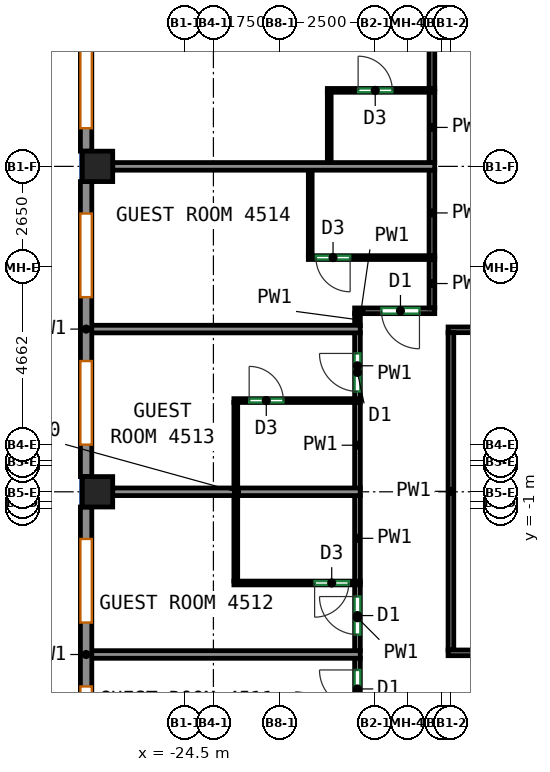
"""IFC4 building model, lengths in metres.
Left out: names, types, materials, properties, quantities, classifications, styles, units other than length and angle.
Written with IfcOpenShell. Run it as: python <this file> out.ifc"""

import sys

from ifc_helpers import new_model, si_unit, direction, frame, frame_2d, origin, origin_2d, place, context, subcontext, project, spatial, rectangle, extrude, source, transform, mapped, element, fill, save


model = new_model("IFC4")
c1 = context("Model", 3, precision=1e-05, world=origin(), true_north=direction((0.0, 1.0)))
c2 = subcontext(c1, "Body", "Model", "MODEL_VIEW")
j1 = project(units=[si_unit("LENGTHUNIT", "METRE"), si_unit("PLANEANGLEUNIT", "RADIAN")], contexts=[c1])
p1 = place(None, origin())
s1 = spatial("IfcSite", under=j1, at=p1, CompositionType="ELEMENT")
p2 = place(p1, origin())
s2 = spatial("IfcBuilding", under=s1, at=p2, CompositionType="ELEMENT")
p3 = place(p2, frame((0.0, 0.0, 188.9)))
s3 = spatial("IfcBuildingStorey", under=s2, at=p3, CompositionType="ELEMENT", Elevation=188.9)
m1 = source(origin(), c2, "Body", "SweptSolid", [
    extrude(rectangle(XDim=0.8, YDim=0.8, at=origin_2d()), origin(), (0.0, 0.0, 1.0), 3.12),
])
for number, where, z_axis, x_axis in (
    (1, (-26.8, -0.562, 0.0), (0.0, 0.0, 1.0), (1.0, 0.0, 0.0)),
    (2, (-26.8, 8.0, 0.0), (0.0, 0.0, 1.0), (1.0, 0.0, 0.0)),
):
    element("IfcColumn", number, at=place(p3, frame(where, z_axis=z_axis, x_axis=x_axis)), inside=s3, PredefinedType="COLUMN", context=c2, shape_type="MappedRepresentation", body=[
        mapped(m1, transform((0.0, 0.0, 0.0))),
    ])
m2 = source(origin(), c2, "Body", "SweptSolid", [
    extrude(rectangle(XDim=13.632, YDim=0.3, at=frame_2d((6.816, 0.0))), origin(), (0.0, 0.0, 1.0), 3.12),
])
p4 = place(p3, frame((-27.1, 22.032, 0.0), z_axis=(0.0, 0.0, 1.0), x_axis=(0.0, -1.0, 0.0)))
e3 = element("IfcWall", 3, at=p4, inside=s3, PredefinedType="SOLIDWALL", context=c2, shape_type="MappedRepresentation", body=[
    mapped(m2, transform((0.0, 0.0, 0.0))),
])
p5 = place(p4, frame((0.604, 0.0, 0.85)))
e4 = element("IfcOpeningElement", 4, at=p5, cuts=e3, PredefinedType="OPENING", context=c2, shape_type="SweptSolid", body=[
    extrude(rectangle(XDim=2.2, YDim=1.95, at=frame_2d((1.1, 0.975))), frame((0.0, 0.16, 0.0), z_axis=(0.0, -1.0, 0.0), x_axis=(1.0, 0.0, 0.0)), (0.0, 0.0, 1.0), 0.32),
])
p6 = place(p4, frame((4.012, 0.0, 0.85)))
e5 = element("IfcOpeningElement", 5, at=p6, cuts=e3, PredefinedType="OPENING", context=c2, shape_type="SweptSolid", body=[
    extrude(rectangle(XDim=2.2, YDim=1.95, at=frame_2d((1.1, 0.975))), frame((0.0, 0.16, 0.0), z_axis=(0.0, -1.0, 0.0), x_axis=(1.0, 0.0, 0.0)), (0.0, 0.0, 1.0), 0.32),
])
p7 = place(p4, frame((7.42, 0.0, 0.85)))
e6 = element("IfcOpeningElement", 6, at=p7, cuts=e3, PredefinedType="OPENING", context=c2, shape_type="SweptSolid", body=[
    extrude(rectangle(XDim=2.2, YDim=1.95, at=frame_2d((1.1, 0.975))), frame((0.0, 0.16, 0.0), z_axis=(0.0, -1.0, 0.0), x_axis=(1.0, 0.0, 0.0)), (0.0, 0.0, 1.0), 0.32),
])
p8 = place(p4, frame((10.828, 0.0, 0.85)))
e7 = element("IfcOpeningElement", 7, at=p8, cuts=e3, PredefinedType="OPENING", context=c2, shape_type="SweptSolid", body=[
    extrude(rectangle(XDim=2.2, YDim=1.95, at=frame_2d((1.1, 0.975))), frame((0.0, 0.16, 0.0), z_axis=(0.0, -1.0, 0.0), x_axis=(1.0, 0.0, 0.0)), (0.0, 0.0, 1.0), 0.32),
])
m3 = source(origin(), c2, "Body", "SweptSolid", [
    extrude(rectangle(XDim=7.763, YDim=0.3, at=frame_2d((3.881, 0.0))), origin(), (0.0, 0.0, 1.0), 3.12),
])
p9 = place(p3, frame((-27.1, 7.6, 0.0), z_axis=(0.0, 0.0, 1.0), x_axis=(0.0, -1.0, 0.0)))
e8 = element("IfcWall", 8, at=p9, inside=s3, PredefinedType="SOLIDWALL", context=c2, shape_type="MappedRepresentation", body=[
    mapped(m3, transform((0.0, 0.0, 0.0))),
])
p10 = place(p9, frame((0.841, 0.0, 0.85)))
e9 = element("IfcOpeningElement", 9, at=p10, cuts=e8, PredefinedType="OPENING", context=c2, shape_type="SweptSolid", body=[
    extrude(rectangle(XDim=2.2, YDim=1.95, at=frame_2d((1.1, 0.975))), frame((0.0, 0.16, 0.0), z_axis=(0.0, -1.0, 0.0), x_axis=(1.0, 0.0, 0.0)), (0.0, 0.0, 1.0), 0.32),
])
p11 = place(p9, frame((4.722, 0.0, 0.85)))
e10 = element("IfcOpeningElement", 10, at=p11, cuts=e8, PredefinedType="OPENING", context=c2, shape_type="SweptSolid", body=[
    extrude(rectangle(XDim=2.2, YDim=1.95, at=frame_2d((1.1, 0.975))), frame((0.0, 0.16, 0.0), z_axis=(0.0, -1.0, 0.0), x_axis=(1.0, 0.0, 0.0)), (0.0, 0.0, 1.0), 0.32),
])
p12 = place(p3, frame((-27.1, -0.962, 0.0), z_axis=(0.0, 0.0, 1.0), x_axis=(0.0, -1.0, 0.0)))
e11 = element("IfcWall", 11, at=p12, inside=s3, PredefinedType="SOLIDWALL", context=c2, shape_type="MappedRepresentation", body=[
    mapped(m3, transform((0.0, 0.0, 0.0))),
])
p13 = place(p12, frame((0.841, 0.0, 0.85)))
e12 = element("IfcOpeningElement", 12, at=p13, cuts=e11, PredefinedType="OPENING", context=c2, shape_type="SweptSolid", body=[
    extrude(rectangle(XDim=2.2, YDim=1.95, at=frame_2d((1.1, 0.975))), frame((0.0, 0.16, 0.0), z_axis=(0.0, -1.0, 0.0), x_axis=(1.0, 0.0, 0.0)), (0.0, 0.0, 1.0), 0.32),
])
p14 = place(p12, frame((4.722, 0.0, 0.85)))
e13 = element("IfcOpeningElement", 13, at=p14, cuts=e11, PredefinedType="OPENING", context=c2, shape_type="SweptSolid", body=[
    extrude(rectangle(XDim=2.2, YDim=1.95, at=frame_2d((1.1, 0.975))), frame((0.0, 0.16, 0.0), z_axis=(0.0, -1.0, 0.0), x_axis=(1.0, 0.0, 0.0)), (0.0, 0.0, 1.0), 0.32),
])
p15 = place(p3, frame((-19.959, -6.685, 0.0), z_axis=(0.0, 0.0, 1.0), x_axis=(0.0, 1.0, 0.0)))
e14 = element("IfcWall", 14, at=p15, inside=s3, PredefinedType="PARTITIONING", context=c2, shape_type="SweptSolid", body=[
    extrude(rectangle(XDim=1.752, YDim=0.15, at=frame_2d((0.876, 0.0))), origin(), (0.0, 0.0, 1.0), 3.12),
])
p16 = place(p15, frame((0.435, 0.0, 0.0)))
e15 = element("IfcOpeningElement", 15, at=p16, cuts=e14, PredefinedType="OPENING", context=c2, shape_type="SweptSolid", body=[
    extrude(rectangle(XDim=1.0, YDim=2.1, at=frame_2d((0.5, 1.05))), frame((0.0, 0.085, 0.0), z_axis=(0.0, -1.0, 0.0), x_axis=(1.0, 0.0, 0.0)), (0.0, 0.0, 1.0), 0.17),
])
p17 = place(p3, frame((-19.959, -4.753, 0.0), z_axis=(0.0, 0.0, 1.0), x_axis=(0.0, 1.0, 0.0)))
e16 = element("IfcWall", 16, at=p17, inside=s3, PredefinedType="PARTITIONING", context=c2, shape_type="SweptSolid", body=[
    extrude(rectangle(XDim=1.751, YDim=0.15, at=frame_2d((0.875, 0.0))), origin(), (0.0, 0.0, 1.0), 3.12),
])
p18 = place(p17, frame((0.434, 0.0, 0.0)))
e17 = element("IfcOpeningElement", 17, at=p18, cuts=e16, PredefinedType="OPENING", context=c2, shape_type="SweptSolid", body=[
    extrude(rectangle(XDim=1.0, YDim=2.1, at=frame_2d((0.5, 1.05))), frame((0.0, 0.085, 0.0), z_axis=(0.0, -1.0, 0.0), x_axis=(1.0, 0.0, 0.0)), (0.0, 0.0, 1.0), 0.17),
])
p19 = place(p3, frame((-19.959, -2.922, 0.0), z_axis=(0.0, 0.0, 1.0), x_axis=(0.0, 1.0, 0.0)))
e18 = element("IfcWall", 18, at=p19, inside=s3, PredefinedType="PARTITIONING", context=c2, shape_type="SweptSolid", body=[
    extrude(rectangle(XDim=2.27, YDim=0.15, at=frame_2d((1.135, 0.0))), origin(), (0.0, 0.0, 1.0), 3.12),
])
p20 = place(p3, frame((-19.959, 1.878, 0.0), z_axis=(0.0, 0.0, 1.0), x_axis=(0.0, 1.0, 0.0)))
e19 = element("IfcWall", 19, at=p20, inside=s3, PredefinedType="PARTITIONING", context=c2, shape_type="SweptSolid", body=[
    extrude(rectangle(XDim=1.751, YDim=0.15, at=frame_2d((0.875, 0.0))), origin(), (0.0, 0.0, 1.0), 3.12),
])
p21 = place(p20, frame((0.2, 0.0, 0.0)))
e20 = element("IfcOpeningElement", 20, at=p21, cuts=e19, PredefinedType="OPENING", context=c2, shape_type="SweptSolid", body=[
    extrude(rectangle(XDim=1.0, YDim=2.1, at=frame_2d((0.5, 1.05))), frame((0.0, 0.085, 0.0), z_axis=(0.0, -1.0, 0.0), x_axis=(1.0, 0.0, 0.0)), (0.0, 0.0, 1.0), 0.17),
])
p22 = place(p3, frame((-19.959, -0.472, 0.0), z_axis=(0.0, 0.0, 1.0), x_axis=(0.0, 1.0, 0.0)))
e21 = element("IfcWall", 21, at=p22, inside=s3, PredefinedType="PARTITIONING", context=c2, shape_type="SweptSolid", body=[
    extrude(rectangle(XDim=2.27, YDim=0.15, at=frame_2d((1.135, 0.0))), origin(), (0.0, 0.0, 1.0), 3.12),
])
p23 = place(p3, frame((-19.959, 3.809, 0.0), z_axis=(0.0, 0.0, 1.0), x_axis=(0.0, 1.0, 0.0)))
e22 = element("IfcWall", 22, at=p23, inside=s3, PredefinedType="PARTITIONING", context=c2, shape_type="SweptSolid", body=[
    extrude(rectangle(XDim=0.316, YDim=0.15, at=frame_2d((0.158, 0.0))), origin(), (0.0, 0.0, 1.0), 3.12),
])
p24 = place(p3, frame((-17.925, 4.2, 0.0), z_axis=(0.0, 0.0, 1.0), x_axis=(-1.0, 0.0, 0.0)))
e23 = element("IfcWall", 23, at=p24, inside=s3, PredefinedType="PARTITIONING", context=c2, shape_type="SweptSolid", body=[
    extrude(rectangle(XDim=2.109, YDim=0.15, at=frame_2d((1.054, 0.0))), origin(), (0.0, 0.0, 1.0), 3.12),
])
p25 = place(p24, frame((0.403, 0.0, 0.0)))
e24 = element("IfcOpeningElement", 24, at=p25, cuts=e23, PredefinedType="OPENING", context=c2, shape_type="SweptSolid", body=[
    extrude(rectangle(XDim=1.0, YDim=2.1, at=frame_2d((0.5, 1.05))), frame((0.0, 0.085, 0.0), z_axis=(0.0, -1.0, 0.0), x_axis=(1.0, 0.0, 0.0)), (0.0, 0.0, 1.0), 0.17),
])
p26 = place(p3, frame((-18.0, 4.275, 0.0), z_axis=(0.0, 0.0, 1.0), x_axis=(0.0, 1.0, 0.0)))
e25 = element("IfcWall", 25, at=p26, inside=s3, PredefinedType="PARTITIONING", context=c2, shape_type="SweptSolid", body=[
    extrude(rectangle(XDim=1.285, YDim=0.15, at=frame_2d((0.643, 0.0))), origin(), (0.0, 0.0, 1.0), 3.12),
])
p27 = place(p3, frame((-18.0, 5.64, 0.0), z_axis=(0.0, 0.0, 1.0), x_axis=(0.0, 1.0, 0.0)))
e26 = element("IfcWall", 26, at=p27, inside=s3, PredefinedType="PARTITIONING", context=c2, shape_type="SweptSolid", body=[
    extrude(rectangle(XDim=2.27, YDim=0.15, at=frame_2d((1.135, 0.0))), origin(), (0.0, 0.0, 1.0), 3.12),
])
p28 = place(p3, frame((-18.0, 10.04, 0.0), z_axis=(0.0, 0.0, 1.0), x_axis=(0.0, 1.0, 0.0)))
e27 = element("IfcWall", 27, at=p28, inside=s3, PredefinedType="PARTITIONING", context=c2, shape_type="SweptSolid", body=[
    extrude(rectangle(XDim=4.707, YDim=0.15, at=frame_2d((2.354, 0.0))), origin(), (0.0, 0.0, 1.0), 3.12),
])
p29 = place(p28, frame((3.206, 0.0, 0.0)))
e28 = element("IfcOpeningElement", 28, at=p29, cuts=e27, PredefinedType="OPENING", context=c2, shape_type="SweptSolid", body=[
    extrude(rectangle(XDim=1.0, YDim=2.1, at=frame_2d((0.5, 1.05))), frame((0.0, 0.085, 0.0), z_axis=(0.0, -1.0, 0.0), x_axis=(1.0, 0.0, 0.0)), (0.0, 0.0, 1.0), 0.17),
])
p30 = place(p3, frame((-18.0, 8.09, 0.0), z_axis=(0.0, 0.0, 1.0), x_axis=(0.0, 1.0, 0.0)))
e29 = element("IfcWall", 29, at=p30, inside=s3, PredefinedType="PARTITIONING", context=c2, shape_type="SweptSolid", body=[
    extrude(rectangle(XDim=1.87, YDim=0.15, at=frame_2d((0.935, 0.0))), origin(), (0.0, 0.0, 1.0), 3.12),
])
p31 = place(p3, frame((-17.575, 3.7, 0.0), z_axis=(0.0, 0.0, 1.0), x_axis=(1.0, 0.0, 0.0)))
e30 = element("IfcWall", 30, at=p31, inside=s3, PredefinedType="PARTITIONING", context=c2, shape_type="SweptSolid", body=[
    extrude(rectangle(XDim=33.85, YDim=0.15, at=frame_2d((16.925, 0.0))), origin(), (0.0, 0.0, 1.0), 3.12),
])
p32 = place(p31, frame((10.584, 0.0, 0.0)))
e31 = element("IfcOpeningElement", 31, at=p32, cuts=e30, PredefinedType="OPENING", context=c2, shape_type="SweptSolid", body=[
    extrude(rectangle(XDim=0.9, YDim=2.1, at=frame_2d((0.45, 1.05))), frame((0.0, 0.085, 0.0), z_axis=(0.0, -1.0, 0.0), x_axis=(1.0, 0.0, 0.0)), (0.0, 0.0, 1.0), 0.17),
])
p33 = place(p31, frame((16.175, 0.0, 0.0)))
e32 = element("IfcOpeningElement", 32, at=p33, cuts=e30, PredefinedType="OPENING", context=c2, shape_type="SweptSolid", body=[
    extrude(rectangle(XDim=0.9, YDim=2.1, at=frame_2d((0.45, 1.05))), frame((0.0, 0.085, 0.0), z_axis=(0.0, -1.0, 0.0), x_axis=(1.0, 0.0, 0.0)), (0.0, 0.0, 1.0), 0.17),
])
p34 = place(p31, frame((25.696, 0.0, 0.0)))
e33 = element("IfcOpeningElement", 33, at=p34, cuts=e30, PredefinedType="OPENING", context=c2, shape_type="SweptSolid", body=[
    extrude(rectangle(XDim=0.9, YDim=2.1, at=frame_2d((0.45, 1.05))), frame((0.0, 0.085, 0.0), z_axis=(0.0, -1.0, 0.0), x_axis=(1.0, 0.0, 0.0)), (0.0, 0.0, 1.0), 0.17),
])
p35 = place(p3, frame((-17.5, -4.725, 0.0), z_axis=(0.0, 0.0, 1.0), x_axis=(0.0, 1.0, 0.0)))
e34 = element("IfcWall", 34, at=p35, inside=s3, PredefinedType="PARTITIONING", context=c2, shape_type="SweptSolid", body=[
    extrude(rectangle(XDim=8.35, YDim=0.15, at=frame_2d((4.175, 0.0))), origin(), (0.0, 0.0, 1.0), 3.12),
])
p36 = place(p3, frame((-17.575, -4.8, 0.0), z_axis=(0.0, 0.0, 1.0), x_axis=(1.0, 0.0, 0.0)))
e35 = element("IfcWall", 35, at=p36, inside=s3, PredefinedType="PARTITIONING", context=c2, shape_type="SweptSolid", body=[
    extrude(rectangle(XDim=3.702, YDim=0.15, at=frame_2d((1.851, 0.0))), origin(), (0.0, 0.0, 1.0), 3.12),
])
p37 = place(p3, frame((-27.0, -4.843, 0.0), z_axis=(0.0, 0.0, 1.0), x_axis=(1.0, 0.0, 0.0)))
e36 = element("IfcWall", 36, at=p37, inside=s3, PredefinedType="PARTITIONING", context=c2, shape_type="SweptSolid", body=[
    extrude(rectangle(XDim=7.114, YDim=0.2, at=frame_2d((3.557, 0.0))), origin(), (0.0, 0.0, 1.0), 3.12),
])
p38 = place(p3, frame((-19.886, -2.962, 0.0), z_axis=(0.0, 0.0, 1.0), x_axis=(-1.0, 0.0, 0.0)))
e37 = element("IfcWall", 37, at=p38, inside=s3, PredefinedType="PARTITIONING", context=c2, shape_type="SweptSolid", body=[
    extrude(rectangle(XDim=3.325, YDim=0.1, at=frame_2d((1.663, 0.0))), origin(), (0.0, 0.0, 1.0), 3.12),
])
p39 = place(p38, frame((0.301, 0.0, 0.0)))
e38 = element("IfcOpeningElement", 38, at=p39, cuts=e37, PredefinedType="OPENING", context=c2, shape_type="SweptSolid", body=[
    extrude(rectangle(XDim=0.9, YDim=2.1, at=frame_2d((0.45, 1.05))), frame((0.0, 0.06, 0.0), z_axis=(0.0, -1.0, 0.0), x_axis=(1.0, 0.0, 0.0)), (0.0, 0.0, 1.0), 0.12),
])
p40 = place(p3, frame((-23.161, -2.912, 0.0), z_axis=(0.0, 0.0, 1.0), x_axis=(0.0, 1.0, 0.0)))
e39 = element("IfcWall", 39, at=p40, inside=s3, PredefinedType="PARTITIONING", context=c2, shape_type="SweptSolid", body=[
    extrude(rectangle(XDim=2.25, YDim=0.1, at=frame_2d((1.125, 0.0))), origin(), (0.0, 0.0, 1.0), 3.12),
])
p41 = place(p3, frame((-26.4, -0.562, 0.0), z_axis=(0.0, 0.0, 1.0), x_axis=(1.0, 0.0, 0.0)))
e40 = element("IfcWall", 40, at=p41, inside=s3, PredefinedType="PARTITIONING", context=c2, shape_type="SweptSolid", body=[
    extrude(rectangle(XDim=6.514, YDim=0.2, at=frame_2d((3.257, 0.0))), origin(), (0.0, 0.0, 1.0), 2.52),
])
p42 = place(p3, frame((-23.211, 1.838, 0.0), z_axis=(0.0, 0.0, 1.0), x_axis=(1.0, 0.0, 0.0)))
e41 = element("IfcWall", 41, at=p42, inside=s3, PredefinedType="PARTITIONING", context=c2, shape_type="SweptSolid", body=[
    extrude(rectangle(XDim=3.325, YDim=0.1, at=frame_2d((1.663, 0.0))), origin(), (0.0, 0.0, 1.0), 3.12),
])
p43 = place(p42, frame((0.402, 0.0, 0.0)))
e42 = element("IfcOpeningElement", 42, at=p43, cuts=e41, PredefinedType="OPENING", context=c2, shape_type="SweptSolid", body=[
    extrude(rectangle(XDim=0.9, YDim=2.1, at=frame_2d((0.45, 1.05))), frame((0.0, 0.06, 0.0), z_axis=(0.0, -1.0, 0.0), x_axis=(1.0, 0.0, 0.0)), (0.0, 0.0, 1.0), 0.12),
])
p44 = place(p3, frame((-23.161, -0.462, 0.0), z_axis=(0.0, 0.0, 1.0), x_axis=(0.0, 1.0, 0.0)))
e43 = element("IfcWall", 43, at=p44, inside=s3, PredefinedType="PARTITIONING", context=c2, shape_type="SweptSolid", body=[
    extrude(rectangle(XDim=2.25, YDim=0.1, at=frame_2d((1.125, 0.0))), origin(), (0.0, 0.0, 1.0), 3.12),
])
p45 = place(p3, frame((-27.0, 3.719, 0.0), z_axis=(0.0, 0.0, 1.0), x_axis=(1.0, 0.0, 0.0)))
e44 = element("IfcWall", 44, at=p45, inside=s3, PredefinedType="PARTITIONING", context=c2, shape_type="SweptSolid", body=[
    extrude(rectangle(XDim=7.114, YDim=0.2, at=frame_2d((3.557, 0.0))), origin(), (0.0, 0.0, 1.0), 3.12),
])
p46 = place(p3, frame((-17.927, 5.6, 0.0), z_axis=(0.0, 0.0, 1.0), x_axis=(-1.0, 0.0, 0.0)))
e45 = element("IfcWall", 45, at=p46, inside=s3, PredefinedType="PARTITIONING", context=c2, shape_type="SweptSolid", body=[
    extrude(rectangle(XDim=3.325, YDim=0.1, at=frame_2d((1.663, 0.0))), origin(), (0.0, 0.0, 1.0), 3.12),
])
p47 = place(p46, frame((2.225, 0.0, 0.0)))
e46 = element("IfcOpeningElement", 46, at=p47, cuts=e45, PredefinedType="OPENING", context=c2, shape_type="SweptSolid", body=[
    extrude(rectangle(XDim=0.9, YDim=2.1, at=frame_2d((0.45, 1.05))), frame((0.0, 0.06, 0.0), z_axis=(0.0, -1.0, 0.0), x_axis=(1.0, 0.0, 0.0)), (0.0, 0.0, 1.0), 0.12),
])
p48 = place(p3, frame((-21.202, 5.65, 0.0), z_axis=(0.0, 0.0, 1.0), x_axis=(0.0, 1.0, 0.0)))
e47 = element("IfcWall", 47, at=p48, inside=s3, PredefinedType="PARTITIONING", context=c2, shape_type="SweptSolid", body=[
    extrude(rectangle(XDim=2.25, YDim=0.1, at=frame_2d((1.125, 0.0))), origin(), (0.0, 0.0, 1.0), 3.12),
])
p49 = place(p3, frame((-26.4, 8.0, 0.0), z_axis=(0.0, 0.0, 1.0), x_axis=(1.0, 0.0, 0.0)))
e48 = element("IfcWall", 48, at=p49, inside=s3, PredefinedType="PARTITIONING", context=c2, shape_type="SweptSolid", body=[
    extrude(rectangle(XDim=8.473, YDim=0.2, at=frame_2d((4.236, 0.0))), origin(), (0.0, 0.0, 1.0), 3.12),
])
p50 = place(p3, frame((-20.752, 10.0, 0.0), z_axis=(0.0, 0.0, 1.0), x_axis=(1.0, 0.0, 0.0)))
e49 = element("IfcWall", 49, at=p50, inside=s3, PredefinedType="PARTITIONING", context=c2, shape_type="SweptSolid", body=[
    extrude(rectangle(XDim=2.825, YDim=0.1, at=frame_2d((1.413, 0.0))), origin(), (0.0, 0.0, 1.0), 3.12),
])
p51 = place(p50, frame((0.81, 0.0, 0.0)))
e50 = element("IfcOpeningElement", 50, at=p51, cuts=e49, PredefinedType="OPENING", context=c2, shape_type="SweptSolid", body=[
    extrude(rectangle(XDim=0.9, YDim=2.1, at=frame_2d((0.45, 1.05))), frame((0.0, 0.06, 0.0), z_axis=(0.0, -1.0, 0.0), x_axis=(1.0, 0.0, 0.0)), (0.0, 0.0, 1.0), 0.12),
])
p52 = place(p3, frame((-20.702, 8.1, 0.0), z_axis=(0.0, 0.0, 1.0), x_axis=(0.0, 1.0, 0.0)))
e51 = element("IfcWall", 51, at=p52, inside=s3, PredefinedType="PARTITIONING", context=c2, shape_type="SweptSolid", body=[
    extrude(rectangle(XDim=1.85, YDim=0.1, at=frame_2d((0.925, 0.0))), origin(), (0.0, 0.0, 1.0), 3.12),
])
p53 = place(p8, origin())
e52 = element("IfcWindow", 52, at=p53, inside=s3, PartitioningType="SINGLE_PANEL", PredefinedType="WINDOW", context=c2, shape_type="SweptSolid", body=[
    extrude(rectangle(XDim=2.2, YDim=1.95, at=frame_2d((1.1, 0.975))), frame((0.0, 0.03, 0.0), z_axis=(0.0, -1.0, 0.0), x_axis=(1.0, 0.0, 0.0)), (0.0, 0.0, 1.0), 0.06),
])
fill(e7, e52)
p54 = place(p10, origin())
e53 = element("IfcWindow", 53, at=p54, inside=s3, PartitioningType="SINGLE_PANEL", PredefinedType="WINDOW", context=c2, shape_type="SweptSolid", body=[
    extrude(rectangle(XDim=2.2, YDim=1.95, at=frame_2d((1.1, 0.975))), frame((0.0, 0.03, 0.0), z_axis=(0.0, -1.0, 0.0), x_axis=(1.0, 0.0, 0.0)), (0.0, 0.0, 1.0), 0.06),
])
fill(e9, e53)
p55 = place(p11, origin())
e54 = element("IfcWindow", 54, at=p55, inside=s3, PartitioningType="SINGLE_PANEL", PredefinedType="WINDOW", context=c2, shape_type="SweptSolid", body=[
    extrude(rectangle(XDim=2.2, YDim=1.95, at=frame_2d((1.1, 0.975))), frame((0.0, 0.03, 0.0), z_axis=(0.0, -1.0, 0.0), x_axis=(1.0, 0.0, 0.0)), (0.0, 0.0, 1.0), 0.06),
])
fill(e10, e54)
p56 = place(p13, origin())
e55 = element("IfcWindow", 55, at=p56, inside=s3, PartitioningType="SINGLE_PANEL", PredefinedType="WINDOW", context=c2, shape_type="SweptSolid", body=[
    extrude(rectangle(XDim=2.2, YDim=1.95, at=frame_2d((1.1, 0.975))), frame((0.0, 0.03, 0.0), z_axis=(0.0, -1.0, 0.0), x_axis=(1.0, 0.0, 0.0)), (0.0, 0.0, 1.0), 0.06),
])
fill(e12, e55)
p57 = place(p14, origin())
e56 = element("IfcWindow", 56, at=p57, inside=s3, PartitioningType="SINGLE_PANEL", PredefinedType="WINDOW", context=c2, shape_type="SweptSolid", body=[
    extrude(rectangle(XDim=2.2, YDim=1.95, at=frame_2d((1.1, 0.975))), frame((0.0, 0.03, 0.0), z_axis=(0.0, -1.0, 0.0), x_axis=(1.0, 0.0, 0.0)), (0.0, 0.0, 1.0), 0.06),
])
fill(e13, e56)
p58 = place(p16, origin())
e57 = element("IfcDoor", 57, at=p58, inside=s3, OperationType="SINGLE_SWING_RIGHT", PredefinedType="DOOR", context=c2, shape_type="SweptSolid", body=[
    extrude(rectangle(XDim=1.0, YDim=2.1, at=frame_2d((0.5, 1.05))), frame((0.0, 0.025, 0.0), z_axis=(0.0, -1.0, 0.0), x_axis=(1.0, 0.0, 0.0)), (0.0, 0.0, 1.0), 0.05),
])
fill(e15, e57)
p59 = place(p18, origin())
e58 = element("IfcDoor", 58, at=p59, inside=s3, OperationType="SINGLE_SWING_RIGHT", PredefinedType="DOOR", context=c2, shape_type="SweptSolid", body=[
    extrude(rectangle(XDim=1.0, YDim=2.1, at=frame_2d((0.5, 1.05))), frame((0.0, 0.025, 0.0), z_axis=(0.0, -1.0, 0.0), x_axis=(1.0, 0.0, 0.0)), (0.0, 0.0, 1.0), 0.05),
])
fill(e17, e58)
p60 = place(p39, origin())
e59 = element("IfcDoor", 59, at=p60, inside=s3, OperationType="SINGLE_SWING_RIGHT", PredefinedType="DOOR", context=c2, shape_type="SweptSolid", body=[
    extrude(rectangle(XDim=0.9, YDim=2.1, at=frame_2d((0.45, 1.05))), frame((0.0, 0.025, 0.0), z_axis=(0.0, -1.0, 0.0), x_axis=(1.0, 0.0, 0.0)), (0.0, 0.0, 1.0), 0.05),
])
fill(e38, e59)
p61 = place(p43, origin())
e60 = element("IfcDoor", 60, at=p61, inside=s3, OperationType="SINGLE_SWING_LEFT", PredefinedType="DOOR", context=c2, shape_type="SweptSolid", body=[
    extrude(rectangle(XDim=0.9, YDim=2.1, at=frame_2d((0.45, 1.05))), frame((0.0, 0.025, 0.0), z_axis=(0.0, -1.0, 0.0), x_axis=(1.0, 0.0, 0.0)), (0.0, 0.0, 1.0), 0.05),
])
fill(e42, e60)
p62 = place(p21, origin())
e61 = element("IfcDoor", 61, at=p62, inside=s3, OperationType="SINGLE_SWING_RIGHT", PredefinedType="DOOR", context=c2, shape_type="SweptSolid", body=[
    extrude(rectangle(XDim=1.0, YDim=2.1, at=frame_2d((0.5, 1.05))), frame((0.0, 0.025, 0.0), z_axis=(0.0, -1.0, 0.0), x_axis=(1.0, 0.0, 0.0)), (0.0, 0.0, 1.0), 0.05),
])
fill(e20, e61)
p63 = place(p25, origin())
e62 = element("IfcDoor", 62, at=p63, inside=s3, OperationType="SINGLE_SWING_LEFT", PredefinedType="DOOR", context=c2, shape_type="SweptSolid", body=[
    extrude(rectangle(XDim=1.0, YDim=2.1, at=frame_2d((0.5, 1.05))), frame((0.0, 0.025, 0.0), z_axis=(0.0, -1.0, 0.0), x_axis=(1.0, 0.0, 0.0)), (0.0, 0.0, 1.0), 0.05),
])
fill(e24, e62)
p64 = place(p47, origin())
e63 = element("IfcDoor", 63, at=p64, inside=s3, OperationType="SINGLE_SWING_LEFT", PredefinedType="DOOR", context=c2, shape_type="SweptSolid", body=[
    extrude(rectangle(XDim=0.9, YDim=2.1, at=frame_2d((0.45, 1.05))), frame((0.0, 0.025, 0.0), z_axis=(0.0, -1.0, 0.0), x_axis=(1.0, 0.0, 0.0)), (0.0, 0.0, 1.0), 0.05),
])
fill(e46, e63)
p65 = place(p51, origin())
e64 = element("IfcDoor", 64, at=p65, inside=s3, OperationType="SINGLE_SWING_LEFT", PredefinedType="DOOR", context=c2, shape_type="SweptSolid", body=[
    extrude(rectangle(XDim=0.9, YDim=2.1, at=frame_2d((0.45, 1.05))), frame((0.0, 0.025, 0.0), z_axis=(0.0, -1.0, 0.0), x_axis=(1.0, 0.0, 0.0)), (0.0, 0.0, 1.0), 0.05),
])
fill(e50, e64)
save(model, sys.argv[1])
